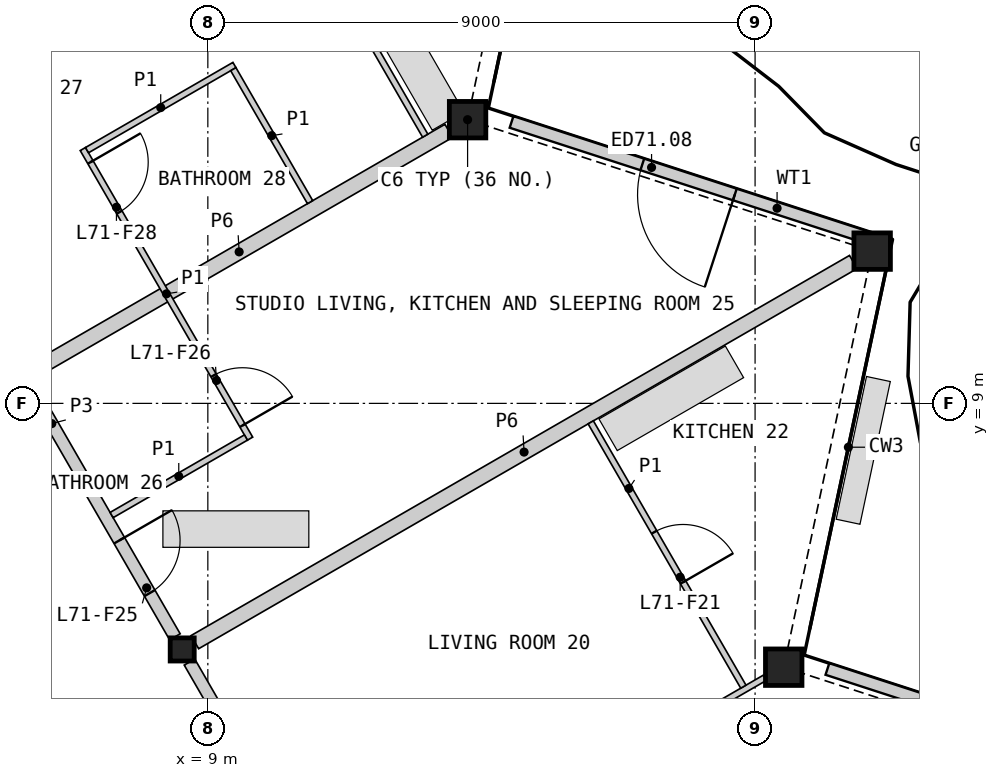
"""IFC4 building model, lengths in metres.
Left out: names, types, materials, properties, quantities, classifications, styles, units other than length and angle.
Written with IfcOpenShell. Run it as: python <this file> out.ifc"""

import sys

from ifc_helpers import new_model, si_unit, direction, frame, frame_2d, origin, origin_2d, place, context, subcontext, project, spatial, polyline, rectangle, hollow_rectangle, i_section, outline, extrude, element, fill, save


model = new_model("IFC4")
c1 = context("Model", 3, precision=1e-05, world=origin(), true_north=direction((0.0, 1.0)))
c2 = subcontext(c1, "Body", "Model", "MODEL_VIEW")
j1 = project(units=[si_unit("LENGTHUNIT", "METRE"), si_unit("PLANEANGLEUNIT", "RADIAN")], contexts=[c1])
p1 = place(None, origin())
s1 = spatial("IfcSite", under=j1, at=p1, CompositionType="ELEMENT")
p2 = place(p1, origin())
s2 = spatial("IfcBuilding", under=s1, at=p2, CompositionType="ELEMENT")
p3 = place(p2, frame((0.0, 0.0, 322.2)))
s3 = spatial("IfcBuildingStorey", under=s2, at=p3, CompositionType="ELEMENT", Elevation=322.2)
for number, where, z_axis, x_axis in (
    (1, (18.471, 4.661, 0.0), (0.0, 0.0, 1.0), (1.0, 0.0, 0.0)),
    (2, (19.926, 11.504, 0.0), (0.0, 0.0, 1.0), (1.0, 0.0, 0.0)),
    (3, (13.272, 13.666, 0.0), (0.0, 0.0, 1.0), (1.0, 0.0, 0.0)),
):
    element("IfcColumn", number, at=place(p3, frame(where, z_axis=z_axis, x_axis=x_axis)), inside=s3, PredefinedType="COLUMN", context=c2, shape_type="SweptSolid", body=[
        extrude(hollow_rectangle(XDim=0.6, YDim=0.6, WallThickness=0.04, at=origin_2d()), origin(), (0.0, 0.0, 1.0), 3.4),
    ])
p4 = place(p3, frame((8.578, 4.953, 0.0), z_axis=(0.0, 0.0, 1.0), x_axis=(1.0, 0.0, 0.0)))
e4 = element("IfcColumn", 4, at=p4, inside=s3, PredefinedType="COLUMN", context=c2, shape_type="SweptSolid", body=[
    extrude(i_section(OverallWidth=0.396, OverallDepth=0.381, WebThickness=0.019, FlangeThickness=0.03, at=origin_2d()), origin(), (0.0, 0.0, 1.0), 3.4),
])
p5 = place(p3, frame((25.012, 2.739, 0.0), z_axis=(0.0, 0.0, 1.0), x_axis=(-0.951056631566, 0.309016639608, 0.0)))
e5 = element("IfcWall", 5, at=p5, inside=s3, PredefinedType="SOLIDWALL", context=c2, shape_type="SweptSolid", body=[
    extrude(rectangle(XDim=6.122, YDim=0.2, at=frame_2d((3.061, 0.0))), origin(), (0.0, 0.0, 1.0), 2.488),
])
p6 = place(p5, frame((2.261, 0.0, 0.0)))
e6 = element("IfcOpeningElement", 6, at=p6, cuts=e5, PredefinedType="OPENING", context=c2, shape_type="SweptSolid", body=[
    extrude(rectangle(XDim=1.6, YDim=2.25, at=frame_2d((0.8, 1.125))), frame((0.0, 0.11, 0.0), z_axis=(0.0, -1.0, 0.0), x_axis=(1.0, 0.0, 0.0)), (0.0, 0.0, 1.0), 0.22),
])
p7 = place(p3, frame((19.817, 11.737, 0.0), z_axis=(0.0, 0.0, 1.0), x_axis=(-0.951056631566, 0.309016639608, 0.0)))
e7 = element("IfcWall", 7, at=p7, inside=s3, PredefinedType="SOLIDWALL", context=c2, shape_type="SweptSolid", body=[
    extrude(rectangle(XDim=6.122, YDim=0.2, at=frame_2d((3.061, 0.0))), origin(), (0.0, 0.0, 1.0), 2.488),
])
p8 = place(p7, frame((2.261, 0.0, 0.0)))
e8 = element("IfcOpeningElement", 8, at=p8, cuts=e7, PredefinedType="OPENING", context=c2, shape_type="SweptSolid", body=[
    extrude(rectangle(XDim=1.6, YDim=2.25, at=frame_2d((0.8, 1.125))), frame((0.0, 0.11, 0.0), z_axis=(0.0, -1.0, 0.0), x_axis=(1.0, 0.0, 0.0)), (0.0, 0.0, 1.0), 0.22),
])
p9 = place(p3, origin())
e9 = element("IfcWall", 9, at=p9, inside=s3, PredefinedType="SHEAR", context=c2, shape_type="SweptSolid", body=[
    extrude(outline(polyline([(1.561, 6.097), (3.731, 7.35), (8.231, -0.444), (6.061, -1.697), (5.96, -1.524), (7.952, -0.374), (6.952, 1.358), (4.96, 0.208), (4.861, 0.381), (6.852, 1.531), (5.852, 3.263), (3.861, 2.113), (3.76, 2.287), (5.752, 3.437), (4.752, 5.169), (2.76, 4.019), (2.66, 4.192), (4.652, 5.342), (3.652, 7.074), (1.66, 5.924), (1.561, 6.097)])), origin(), (0.0, 0.0, 1.0), 3.1),
])
p10 = place(p3, frame((8.686, -0.634, 0.0), z_axis=(0.0, 0.0, 1.0), x_axis=(-0.500004601921, 0.866022746848, 0.0)))
e10 = element("IfcWall", 10, at=p10, inside=s3, PredefinedType="SHEAR", context=c2, shape_type="SweptSolid", body=[
    extrude(rectangle(XDim=16.853, YDim=0.6, at=frame_2d((8.426, 0.0))), origin(), (0.0, 0.0, 1.0), 3.1),
])
p11 = place(p3, frame((8.786, 5.073, 0.0), z_axis=(0.0, 0.0, 1.0), x_axis=(0.86602139559, 0.500006942333, 0.0)))
e11 = element("IfcWall", 11, at=p11, inside=s3, PredefinedType="PARTITIONING", context=c2, shape_type="SweptSolid", body=[
    extrude(rectangle(XDim=12.505, YDim=0.25, at=frame_2d((6.252, 0.0))), origin(), (0.0, 0.0, 1.0), 2.33),
])
p12 = place(p3, frame((4.409, 12.174, 0.0), z_axis=(0.0, 0.0, 1.0), x_axis=(0.499984266882, -0.866034487114, 0.0)))
e12 = element("IfcWall", 12, at=p12, inside=s3, PredefinedType="PARTITIONING", context=c2, shape_type="SweptSolid", body=[
    extrude(rectangle(XDim=8.099, YDim=0.2, at=frame_2d((4.049, 0.0))), origin(), (0.0, 0.0, 1.0), 3.1),
])
p13 = place(p12, frame((6.269, 0.0, 0.0)))
e13 = element("IfcOpeningElement", 13, at=p13, cuts=e12, PredefinedType="OPENING", context=c2, shape_type="SweptSolid", body=[
    extrude(rectangle(XDim=1.0, YDim=2.1, at=frame_2d((0.5, 1.05))), frame((0.0, 0.11, 0.0), z_axis=(0.0, -1.0, 0.0), x_axis=(1.0, 0.0, 0.0)), (0.0, 0.0, 1.0), 0.22),
])
p14 = place(p12, frame((1.164, 0.0, 0.0)))
e14 = element("IfcOpeningElement", 14, at=p14, cuts=e12, PredefinedType="OPENING", context=c2, shape_type="SweptSolid", body=[
    extrude(rectangle(XDim=1.0, YDim=2.1, at=frame_2d((0.5, 1.05))), frame((0.0, 0.11, 0.0), z_axis=(0.0, -1.0, 0.0), x_axis=(1.0, 0.0, 0.0)), (0.0, 0.0, 1.0), 0.22),
])
p15 = place(p3, frame((8.698, 4.745, 0.0), z_axis=(0.0, 0.0, 1.0), x_axis=(0.499984266882, -0.866034487114, 0.0)))
e15 = element("IfcWall", 15, at=p15, inside=s3, PredefinedType="PARTITIONING", context=c2, shape_type="SweptSolid", body=[
    extrude(rectangle(XDim=8.099, YDim=0.2, at=frame_2d((4.049, 0.0))), origin(), (0.0, 0.0, 1.0), 3.1),
])
p16 = place(p15, frame((1.976, 0.0, 0.0)))
e16 = element("IfcOpeningElement", 16, at=p16, cuts=e15, PredefinedType="OPENING", context=c2, shape_type="SweptSolid", body=[
    extrude(rectangle(XDim=1.0, YDim=2.1, at=frame_2d((0.5, 1.05))), frame((0.0, 0.11, 0.0), z_axis=(0.0, -1.0, 0.0), x_axis=(1.0, 0.0, 0.0)), (0.0, 0.0, 1.0), 0.22),
])
p17 = place(p3, frame((6.068, 9.501, 0.0), z_axis=(0.0, 0.0, 1.0), x_axis=(0.866022671543, 0.50000473235, 0.0)))
e17 = element("IfcWall", 17, at=p17, inside=s3, PredefinedType="PARTITIONING", context=c2, shape_type="SweptSolid", body=[
    extrude(rectangle(XDim=7.961, YDim=0.25, at=frame_2d((3.98, 0.0))), origin(), (0.0, 0.0, 1.0), 2.33),
])
p18 = place(p3, frame((3.47, 14.0, 0.0), z_axis=(0.0, 0.0, 1.0), x_axis=(0.866021216079, 0.500007253249, 0.0)))
e18 = element("IfcWall", 18, at=p18, inside=s3, PredefinedType="PARTITIONING", context=c2, shape_type="SweptSolid", body=[
    extrude(rectangle(XDim=12.639, YDim=0.1, at=frame_2d((6.32, 0.0))), origin(), (0.0, 0.0, 1.0), 2.33),
])
p19 = place(p18, frame((8.314, 0.0, 0.0)))
e19 = element("IfcOpeningElement", 19, at=p19, cuts=e18, PredefinedType="OPENING", context=c2, shape_type="SweptSolid", body=[
    extrude(rectangle(XDim=0.95, YDim=2.1, at=frame_2d((0.475, 1.05))), frame((0.0, 0.06, 0.0), z_axis=(0.0, -1.0, 0.0), x_axis=(1.0, 0.0, 0.0)), (0.0, 0.0, 1.0), 0.12),
])
p20 = place(p3, frame((11.262, 0.504, 0.0), z_axis=(0.0, 0.0, 1.0), x_axis=(0.866020217342, 0.500008983073, 0.0)))
e20 = element("IfcWall", 20, at=p20, inside=s3, PredefinedType="PARTITIONING", context=c2, shape_type="SweptSolid", body=[
    extrude(rectangle(XDim=7.966, YDim=0.1, at=frame_2d((3.983, 0.0))), origin(), (0.0, 0.0, 1.0), 2.33),
])
p21 = place(p20, frame((5.362, 0.0, 0.0)))
e21 = element("IfcOpeningElement", 21, at=p21, cuts=e20, PredefinedType="OPENING", context=c2, shape_type="SweptSolid", body=[
    extrude(rectangle(XDim=0.95, YDim=2.1, at=frame_2d((0.475, 1.05))), frame((0.0, 0.06, 0.0), z_axis=(0.0, -1.0, 0.0), x_axis=(1.0, 0.0, 0.0)), (0.0, 0.0, 1.0), 0.12),
])
p22 = place(p3, frame((6.944, 13.183, 0.0), z_axis=(0.0, 0.0, 1.0), x_axis=(0.499996545922, -0.866027397988, 0.0)))
e22 = element("IfcWall", 22, at=p22, inside=s3, PredefinedType="PARTITIONING", context=c2, shape_type="SweptSolid", body=[
    extrude(rectangle(XDim=5.5, YDim=0.1, at=frame_2d((2.75, 0.0))), origin(), (0.0, 0.0, 1.0), 2.33),
])
p23 = place(p22, frame((4.3, 0.0, 0.0)))
e23 = element("IfcOpeningElement", 23, at=p23, cuts=e22, PredefinedType="OPENING", context=c2, shape_type="SweptSolid", body=[
    extrude(rectangle(XDim=0.95, YDim=2.1, at=frame_2d((0.475, 1.05))), frame((0.0, 0.06, 0.0), z_axis=(0.0, -1.0, 0.0), x_axis=(1.0, 0.0, 0.0)), (0.0, 0.0, 1.0), 0.12),
])
p24 = place(p22, frame((0.25, 0.0, 0.0)))
e24 = element("IfcOpeningElement", 24, at=p24, cuts=e22, PredefinedType="OPENING", context=c2, shape_type="SweptSolid", body=[
    extrude(rectangle(XDim=0.95, YDim=2.1, at=frame_2d((0.475, 1.05))), frame((0.0, 0.06, 0.0), z_axis=(0.0, -1.0, 0.0), x_axis=(1.0, 0.0, 0.0)), (0.0, 0.0, 1.0), 0.12),
])
p25 = place(p3, frame((10.065, 17.75, 0.0), z_axis=(0.0, 0.0, 1.0), x_axis=(0.499989096993, -0.866031698547, 0.0)))
e25 = element("IfcWall", 25, at=p25, inside=s3, PredefinedType="PARTITIONING", context=c2, shape_type="SweptSolid", body=[
    extrude(rectangle(XDim=5.02, YDim=0.1, at=frame_2d((2.51, 0.0))), origin(), (0.0, 0.0, 1.0), 2.33),
])
p26 = place(p25, frame((0.862, 0.0, 0.0)))
e26 = element("IfcOpeningElement", 26, at=p26, cuts=e25, PredefinedType="OPENING", context=c2, shape_type="SweptSolid", body=[
    extrude(rectangle(XDim=0.95, YDim=2.1, at=frame_2d((0.475, 1.05))), frame((0.0, 0.06, 0.0), z_axis=(0.0, -1.0, 0.0), x_axis=(1.0, 0.0, 0.0)), (0.0, 0.0, 1.0), 0.12),
])
p27 = place(p3, frame((15.297, 8.688, 0.0), z_axis=(0.0, 0.0, 1.0), x_axis=(0.499989096993, -0.866031698547, 0.0)))
e27 = element("IfcWall", 27, at=p27, inside=s3, PredefinedType="PARTITIONING", context=c2, shape_type="SweptSolid", body=[
    extrude(rectangle(XDim=5.02, YDim=0.1, at=frame_2d((2.51, 0.0))), origin(), (0.0, 0.0, 1.0), 2.33),
])
p28 = place(p27, frame((2.086, 0.0, 0.0)))
e28 = element("IfcOpeningElement", 28, at=p28, cuts=e27, PredefinedType="OPENING", context=c2, shape_type="SweptSolid", body=[
    extrude(rectangle(XDim=0.95, YDim=2.1, at=frame_2d((0.475, 1.05))), frame((0.0, 0.06, 0.0), z_axis=(0.0, -1.0, 0.0), x_axis=(1.0, 0.0, 0.0)), (0.0, 0.0, 1.0), 0.12),
])
p29 = place(p3, frame((7.013, 13.165, 0.0), z_axis=(0.0, 0.0, 1.0), x_axis=(0.866034573852, 0.49998411664, 0.0)))
e29 = element("IfcWall", 29, at=p29, inside=s3, PredefinedType="PARTITIONING", context=c2, shape_type="SweptSolid", body=[
    extrude(rectangle(XDim=2.8, YDim=0.1, at=frame_2d((1.4, 0.0))), origin(), (0.0, 0.0, 1.0), 2.33),
])
p30 = place(p3, frame((7.418, 7.163, 0.0), z_axis=(0.0, 0.0, 1.0), x_axis=(0.866054858364, 0.499948979701, 0.0)))
e30 = element("IfcWall", 30, at=p30, inside=s3, PredefinedType="PARTITIONING", context=c2, shape_type="SweptSolid", body=[
    extrude(rectangle(XDim=2.55, YDim=0.1, at=frame_2d((1.275, 0.0))), origin(), (0.0, 0.0, 1.0), 2.33),
])
p31 = place(p3, frame((9.419, 14.497, 0.0), z_axis=(0.0, 0.0, 1.0), x_axis=(0.499976333282, -0.866039067339, 0.0)))
e31 = element("IfcWall", 31, at=p31, inside=s3, PredefinedType="PARTITIONING", context=c2, shape_type="SweptSolid", body=[
    extrude(rectangle(XDim=2.525, YDim=0.1, at=frame_2d((1.262, 0.0))), origin(), (0.0, 0.0, 1.0), 2.33),
])
p32 = place(p8, origin())
e32 = element("IfcDoor", 32, at=p32, inside=s3, OperationType="DOUBLE_DOOR_SINGLE_SWING", PredefinedType="DOOR", context=c2, shape_type="SweptSolid", body=[
    extrude(rectangle(XDim=1.6, YDim=2.25, at=frame_2d((0.8, 1.125))), frame((0.0, 0.025, 0.0), z_axis=(0.0, -1.0, 0.0), x_axis=(1.0, 0.0, 0.0)), (0.0, 0.0, 1.0), 0.05),
])
fill(e8, e32)
p33 = place(p28, origin())
e33 = element("IfcDoor", 33, at=p33, inside=s3, OperationType="SINGLE_SWING_RIGHT", PredefinedType="DOOR", context=c2, shape_type="SweptSolid", body=[
    extrude(rectangle(XDim=0.95, YDim=2.1, at=frame_2d((0.475, 1.05))), frame((0.0, 0.025, 0.0), z_axis=(0.0, -1.0, 0.0), x_axis=(1.0, 0.0, 0.0)), (0.0, 0.0, 1.0), 0.05),
])
fill(e28, e33)
p34 = place(p13, origin())
e34 = element("IfcDoor", 34, at=p34, inside=s3, OperationType="SINGLE_SWING_LEFT", PredefinedType="DOOR", context=c2, shape_type="SweptSolid", body=[
    extrude(rectangle(XDim=1.0, YDim=2.1, at=frame_2d((0.5, 1.05))), frame((0.0, 0.025, 0.0), z_axis=(0.0, -1.0, 0.0), x_axis=(1.0, 0.0, 0.0)), (0.0, 0.0, 1.0), 0.05),
])
fill(e13, e34)
p35 = place(p23, origin())
e35 = element("IfcDoor", 35, at=p35, inside=s3, OperationType="SINGLE_SWING_RIGHT", PredefinedType="DOOR", context=c2, shape_type="SweptSolid", body=[
    extrude(rectangle(XDim=0.95, YDim=2.1, at=frame_2d((0.475, 1.05))), frame((0.0, 0.025, 0.0), z_axis=(0.0, -1.0, 0.0), x_axis=(1.0, 0.0, 0.0)), (0.0, 0.0, 1.0), 0.05),
])
fill(e23, e35)
p36 = place(p24, origin())
e36 = element("IfcDoor", 36, at=p36, inside=s3, OperationType="SINGLE_SWING_LEFT", PredefinedType="DOOR", context=c2, shape_type="SweptSolid", body=[
    extrude(rectangle(XDim=0.95, YDim=2.1, at=frame_2d((0.475, 1.05))), frame((0.0, 0.025, 0.0), z_axis=(0.0, -1.0, 0.0), x_axis=(1.0, 0.0, 0.0)), (0.0, 0.0, 1.0), 0.05),
])
fill(e24, e36)
save(model, sys.argv[1])
